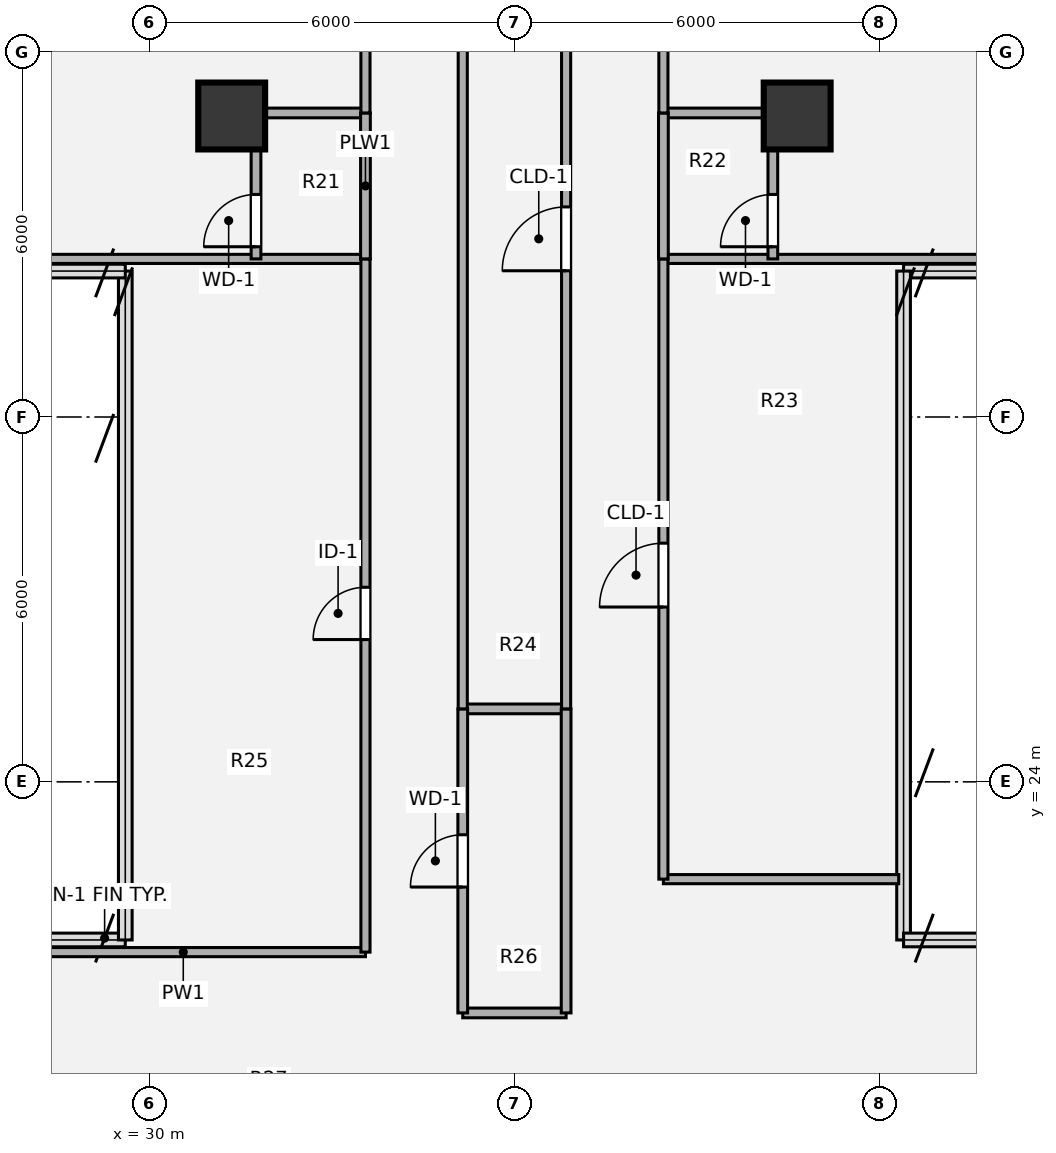
"""IFC4 building model, lengths in metres.
Left out: names, types, materials, properties, quantities, classifications, styles, units other than length and angle.
Written with IfcOpenShell. Run it as: python <this file> out.ifc"""

import sys

from ifc_helpers import new_model, si_unit, direction, frame, frame_2d, origin, origin_2d, place, context, subcontext, project, spatial, rectangle, hollow_circle, extrude, source, transform, mapped, element, fill, save


model = new_model("IFC4")
c1 = context("Model", 3, precision=1e-05, world=origin(), true_north=direction((0.0, 1.0)))
c2 = subcontext(c1, "Body", "Model", "MODEL_VIEW")
j1 = project(units=[si_unit("LENGTHUNIT", "METRE"), si_unit("PLANEANGLEUNIT", "RADIAN")], contexts=[c1])
p1 = place(None, origin())
s1 = spatial("IfcSite", under=j1, at=p1, CompositionType="ELEMENT")
p2 = place(p1, origin())
s2 = spatial("IfcBuilding", under=s1, at=p2, CompositionType="ELEMENT")
p3 = place(p2, frame((0.0, 0.0, 163.98)))
s3 = spatial("IfcBuildingStorey", under=s2, at=p3, CompositionType="ELEMENT", Elevation=163.98)
m1 = source(origin(), c2, "Body", "SweptSolid", [
    extrude(hollow_circle(Radius=0.55, WallThickness=0.04, at=origin_2d()), origin(), (0.0, 0.0, 1.0), 3.78),
])
for number, where, z_axis, x_axis in (
    (1, (31.35, 34.95, 0.0), (0.0, 0.0, 1.0), (1.0, 0.0, 0.0)),
    (2, (40.65, 34.95, 0.0), (0.0, 0.0, 1.0), (1.0, 0.0, 0.0)),
):
    element("IfcColumn", number, at=place(p3, frame(where, z_axis=z_axis, x_axis=x_axis)), inside=s3, PredefinedType="COLUMN", context=c2, shape_type="MappedRepresentation", body=[
        mapped(m1, transform((0.0, 0.0, 0.0), x_axis=(1.0, 0.0, 0.0), y_axis=(0.0, 1.0, 0.0), z_axis=(0.0, 0.0, 1.0), scale=1.0)),
    ])
p4 = place(p3, frame((35.15, 20.2, 0.0), z_axis=(0.0, 0.0, 1.0), x_axis=(1.0, 0.0, 0.0)))
e3 = element("IfcWall", 3, at=p4, inside=s3, PredefinedType="PLUMBINGWALL", context=c2, shape_type="SweptSolid", body=[
    extrude(rectangle(XDim=1.7, YDim=0.16, at=frame_2d((0.85, 0.0))), origin(), (0.0, 0.0, 1.0), 3.5),
])
p5 = place(p3, frame((27.558, 21.2, 0.0), z_axis=(0.0, 0.0, 1.0), x_axis=(1.0, 0.0, 0.0)))
e4 = element("IfcWall", 4, at=p5, inside=s3, PredefinedType="PARTITIONING", context=c2, shape_type="SweptSolid", body=[
    extrude(rectangle(XDim=5.992, YDim=0.15, at=frame_2d((2.996, 0.0))), origin(), (0.0, 0.0, 1.0), 3.5),
])
p6 = place(p3, frame((38.45, 22.4, 0.0), z_axis=(0.0, 0.0, 1.0), x_axis=(1.0, 0.0, 0.0)))
e5 = element("IfcWall", 5, at=p6, inside=s3, PredefinedType="PARTITIONING", context=c2, shape_type="SweptSolid", body=[
    extrude(rectangle(XDim=3.87, YDim=0.15, at=frame_2d((1.935, 0.0))), origin(), (0.0, 0.0, 1.0), 3.5),
])
p7 = place(p3, frame((35.15, 25.2, 0.0), z_axis=(0.0, 0.0, 1.0), x_axis=(1.0, 0.0, 0.0)))
e6 = element("IfcWall", 6, at=p7, inside=s3, PredefinedType="PLUMBINGWALL", context=c2, shape_type="SweptSolid", body=[
    extrude(rectangle(XDim=1.7, YDim=0.16, at=frame_2d((0.85, 0.0))), origin(), (0.0, 0.0, 1.0), 3.5),
])
p8 = place(p3, frame((27.557, 32.6, 0.0), z_axis=(0.0, 0.0, 1.0), x_axis=(1.0, 0.0, 0.0)))
e7 = element("IfcWall", 7, at=p8, inside=s3, PredefinedType="PARTITIONING", context=c2, shape_type="SweptSolid", body=[
    extrude(rectangle(XDim=5.993, YDim=0.15, at=frame_2d((2.997, 0.0))), origin(), (0.0, 0.0, 1.0), 3.5),
])
p9 = place(p3, frame((38.45, 32.6, 0.0), z_axis=(0.0, 0.0, 1.0), x_axis=(1.0, 0.0, 0.0)))
e8 = element("IfcWall", 8, at=p9, inside=s3, PredefinedType="PARTITIONING", context=c2, shape_type="SweptSolid", body=[
    extrude(rectangle(XDim=5.993, YDim=0.15, at=frame_2d((2.997, 0.0))), origin(), (0.0, 0.0, 1.0), 3.5),
])
for number, where, z_axis, x_axis in (
    (9, (31.75, 35.0, 0.0), (0.0, 0.0, 1.0), (1.0, 0.0, 0.0)),
    (10, (38.45, 35.0, 0.0), (0.0, 0.0, 1.0), (1.0, 0.0, 0.0)),
):
    element("IfcWall", number, at=place(p3, frame(where, z_axis=z_axis, x_axis=x_axis)), inside=s3, PredefinedType="PLUMBINGWALL", context=c2, shape_type="SweptSolid", body=[
        extrude(rectangle(XDim=1.8, YDim=0.16, at=frame_2d((0.9, 0.0))), origin(), (0.0, 0.0, 1.0), 2.903),
    ])
p10 = place(p3, frame((31.75, 32.6, 0.0), z_axis=(0.0, 0.0, 1.0), x_axis=(0.0, 1.0, 0.0)))
e11 = element("IfcWall", 11, at=p10, inside=s3, PredefinedType="PLUMBINGWALL", context=c2, shape_type="SweptSolid", body=[
    extrude(rectangle(XDim=2.4, YDim=0.16, at=frame_2d((1.2, 0.0))), origin(), (0.0, 0.0, 1.0), 3.5),
])
p11 = place(p10, frame((0.2, 0.0, 0.0)))
e12 = element("IfcOpeningElement", 12, at=p11, cuts=e11, PredefinedType="OPENING", context=c2, shape_type="SweptSolid", body=[
    extrude(rectangle(XDim=0.86, YDim=2.1, at=origin_2d()), frame((0.43, 0.09, 1.05), z_axis=(0.0, -1.0, 0.0), x_axis=(1.0, 0.0, 0.0)), (0.0, 0.0, 1.0), 0.18),
])
p12 = place(p3, frame((33.55, 21.2, 0.0), z_axis=(0.0, 0.0, 1.0), x_axis=(0.0, 1.0, 0.0)))
e13 = element("IfcWall", 13, at=p12, inside=s3, PredefinedType="PARTITIONING", context=c2, shape_type="SweptSolid", body=[
    extrude(rectangle(XDim=11.4, YDim=0.15, at=frame_2d((5.7, 0.0))), origin(), (0.0, 0.0, 1.0), 3.5),
])
p13 = place(p12, frame((5.14, 0.0, 0.0)))
e14 = element("IfcOpeningElement", 14, at=p13, cuts=e13, PredefinedType="OPENING", context=c2, shape_type="SweptSolid", body=[
    extrude(rectangle(XDim=0.86, YDim=2.1, at=origin_2d()), frame((0.43, 0.085, 1.05), z_axis=(0.0, -1.0, 0.0), x_axis=(1.0, 0.0, 0.0)), (0.0, 0.0, 1.0), 0.17),
])
p14 = place(p3, frame((33.55, 32.6, 0.0), z_axis=(0.0, 0.0, 1.0), x_axis=(0.0, 1.0, 0.0)))
e15 = element("IfcWall", 15, at=p14, inside=s3, PredefinedType="PLUMBINGWALL", context=c2, shape_type="SweptSolid", body=[
    extrude(rectangle(XDim=2.4, YDim=0.16, at=frame_2d((1.2, 0.0))), origin(), (0.0, 0.0, 1.0), 3.5),
])
p15 = place(p3, frame((33.55, 35.0, 0.0), z_axis=(0.0, 0.0, 1.0), x_axis=(0.0, 1.0, 0.0)))
e16 = element("IfcWall", 16, at=p15, inside=s3, PredefinedType="PARTITIONING", context=c2, shape_type="SweptSolid", body=[
    extrude(rectangle(XDim=3.888, YDim=0.15, at=frame_2d((1.944, 0.0))), origin(), (0.0, 0.0, 1.0), 3.5),
])
p16 = place(p15, frame((1.484, 0.0, 0.0)))
e17 = element("IfcOpeningElement", 17, at=p16, cuts=e16, PredefinedType="OPENING", context=c2, shape_type="SweptSolid", body=[
    extrude(rectangle(XDim=0.92, YDim=2.1, at=origin_2d()), frame((0.46, 0.085, 1.05), z_axis=(0.0, -1.0, 0.0), x_axis=(1.0, 0.0, 0.0)), (0.0, 0.0, 1.0), 0.17),
])
p17 = place(p3, frame((35.15, 20.2, 0.0), z_axis=(0.0, 0.0, 1.0), x_axis=(0.0, 1.0, 0.0)))
e18 = element("IfcWall", 18, at=p17, inside=s3, PredefinedType="PLUMBINGWALL", context=c2, shape_type="SweptSolid", body=[
    extrude(rectangle(XDim=5.0, YDim=0.16, at=frame_2d((2.5, 0.0))), origin(), (0.0, 0.0, 1.0), 3.5),
])
p18 = place(p17, frame((2.07, 0.0, 0.0)))
e19 = element("IfcOpeningElement", 19, at=p18, cuts=e18, PredefinedType="OPENING", context=c2, shape_type="SweptSolid", body=[
    extrude(rectangle(XDim=0.86, YDim=2.1, at=origin_2d()), frame((0.43, 0.09, 1.05), z_axis=(0.0, -1.0, 0.0), x_axis=(1.0, 0.0, 0.0)), (0.0, 0.0, 1.0), 0.18),
])
p19 = place(p3, frame((35.15, 25.2, 0.0), z_axis=(0.0, 0.0, 1.0), x_axis=(0.0, 1.0, 0.0)))
e20 = element("IfcWall", 20, at=p19, inside=s3, PredefinedType="PARTITIONING", context=c2, shape_type="SweptSolid", body=[
    extrude(rectangle(XDim=15.46, YDim=0.15, at=frame_2d((7.73, 0.0))), origin(), (0.0, 0.0, 1.0), 3.5),
])
p20 = place(p3, frame((36.85, 20.2, 0.0), z_axis=(0.0, 0.0, 1.0), x_axis=(0.0, 1.0, 0.0)))
e21 = element("IfcWall", 21, at=p20, inside=s3, PredefinedType="PLUMBINGWALL", context=c2, shape_type="SweptSolid", body=[
    extrude(rectangle(XDim=5.0, YDim=0.16, at=frame_2d((2.5, 0.0))), origin(), (0.0, 0.0, 1.0), 3.5),
])
p21 = place(p3, frame((36.85, 25.2, 0.0), z_axis=(0.0, 0.0, 1.0), x_axis=(0.0, 1.0, 0.0)))
e22 = element("IfcWall", 22, at=p21, inside=s3, PredefinedType="PARTITIONING", context=c2, shape_type="SweptSolid", body=[
    extrude(rectangle(XDim=15.46, YDim=0.15, at=frame_2d((7.73, 0.0))), origin(), (0.0, 0.0, 1.0), 3.5),
])
p22 = place(p21, frame((7.205, 0.0, 0.0)))
e23 = element("IfcOpeningElement", 23, at=p22, cuts=e22, PredefinedType="OPENING", context=c2, shape_type="SweptSolid", body=[
    extrude(rectangle(XDim=1.05, YDim=2.1, at=origin_2d()), frame((0.525, 0.085, 1.05), z_axis=(0.0, -1.0, 0.0), x_axis=(1.0, 0.0, 0.0)), (0.0, 0.0, 1.0), 0.17),
])
p23 = place(p3, frame((38.45, 22.4, 0.0), z_axis=(0.0, 0.0, 1.0), x_axis=(0.0, 1.0, 0.0)))
e24 = element("IfcWall", 24, at=p23, inside=s3, PredefinedType="PARTITIONING", context=c2, shape_type="SweptSolid", body=[
    extrude(rectangle(XDim=10.2, YDim=0.15, at=frame_2d((5.1, 0.0))), origin(), (0.0, 0.0, 1.0), 3.5),
])
p24 = place(p23, frame((4.475, 0.0, 0.0)))
e25 = element("IfcOpeningElement", 25, at=p24, cuts=e24, PredefinedType="OPENING", context=c2, shape_type="SweptSolid", body=[
    extrude(rectangle(XDim=1.05, YDim=2.1, at=origin_2d()), frame((0.525, 0.085, 1.05), z_axis=(0.0, -1.0, 0.0), x_axis=(1.0, 0.0, 0.0)), (0.0, 0.0, 1.0), 0.17),
])
p25 = place(p3, frame((38.45, 32.6, 0.0), z_axis=(0.0, 0.0, 1.0), x_axis=(0.0, 1.0, 0.0)))
e26 = element("IfcWall", 26, at=p25, inside=s3, PredefinedType="PLUMBINGWALL", context=c2, shape_type="SweptSolid", body=[
    extrude(rectangle(XDim=2.4, YDim=0.16, at=frame_2d((1.2, 0.0))), origin(), (0.0, 0.0, 1.0), 3.5),
])
p26 = place(p3, frame((38.45, 35.0, 0.0), z_axis=(0.0, 0.0, 1.0), x_axis=(0.0, 1.0, 0.0)))
e27 = element("IfcWall", 27, at=p26, inside=s3, PredefinedType="PARTITIONING", context=c2, shape_type="SweptSolid", body=[
    extrude(rectangle(XDim=3.888, YDim=0.15, at=frame_2d((1.944, 0.0))), origin(), (0.0, 0.0, 1.0), 3.5),
])
p27 = place(p26, frame((1.484, 0.0, 0.0)))
e28 = element("IfcOpeningElement", 28, at=p27, cuts=e27, PredefinedType="OPENING", context=c2, shape_type="SweptSolid", body=[
    extrude(rectangle(XDim=0.92, YDim=2.1, at=origin_2d()), frame((0.46, 0.085, 1.05), z_axis=(0.0, -1.0, 0.0), x_axis=(1.0, 0.0, 0.0)), (0.0, 0.0, 1.0), 0.17),
])
p28 = place(p3, frame((40.25, 32.6, 0.0), z_axis=(0.0, 0.0, 1.0), x_axis=(0.0, 1.0, 0.0)))
e29 = element("IfcWall", 29, at=p28, inside=s3, PredefinedType="PLUMBINGWALL", context=c2, shape_type="SweptSolid", body=[
    extrude(rectangle(XDim=2.4, YDim=0.16, at=frame_2d((1.2, 0.0))), origin(), (0.0, 0.0, 1.0), 3.5),
])
p29 = place(p28, frame((0.2, 0.0, 0.0)))
e30 = element("IfcOpeningElement", 30, at=p29, cuts=e29, PredefinedType="OPENING", context=c2, shape_type="SweptSolid", body=[
    extrude(rectangle(XDim=0.86, YDim=2.1, at=origin_2d()), frame((0.43, 0.09, 1.05), z_axis=(0.0, -1.0, 0.0), x_axis=(1.0, 0.0, 0.0)), (0.0, 0.0, 1.0), 0.18),
])
m2 = source(origin(), c2, "Body", "SweptSolid", [
    extrude(rectangle(XDim=0.86, YDim=2.1, at=origin_2d()), frame((0.43, 0.025, 1.05), z_axis=(0.0, -1.0, 0.0), x_axis=(1.0, 0.0, 0.0)), (0.0, 0.0, 1.0), 0.05),
])
p30 = place(p11, origin())
e31 = element("IfcDoor", 31, at=p30, inside=s3, OperationType="SINGLE_SWING_LEFT", PredefinedType="DOOR", context=c2, shape_type="MappedRepresentation", body=[
    mapped(m2, transform((0.0, 0.0, 0.0), x_axis=(1.0, 0.0, 0.0), y_axis=(0.0, 1.0, 0.0), z_axis=(0.0, 0.0, 1.0), scale=1.0)),
])
fill(e12, e31)
m3 = source(origin(), c2, "Body", "SweptSolid", [
    extrude(rectangle(XDim=0.86, YDim=2.1, at=origin_2d()), frame((0.43, 0.025, 1.05), z_axis=(0.0, -1.0, 0.0), x_axis=(1.0, 0.0, 0.0)), (0.0, 0.0, 1.0), 0.05),
])
p31 = place(p13, origin())
e32 = element("IfcDoor", 32, at=p31, inside=s3, OperationType="SINGLE_SWING_LEFT", PredefinedType="DOOR", context=c2, shape_type="MappedRepresentation", body=[
    mapped(m3, transform((0.0, 0.0, 0.0), x_axis=(1.0, 0.0, 0.0), y_axis=(0.0, 1.0, 0.0), z_axis=(0.0, 0.0, 1.0), scale=1.0)),
])
fill(e14, e32)
p32 = place(p18, origin())
e33 = element("IfcDoor", 33, at=p32, inside=s3, OperationType="SINGLE_SWING_LEFT", PredefinedType="DOOR", context=c2, shape_type="MappedRepresentation", body=[
    mapped(m2, transform((0.0, 0.0, 0.0), x_axis=(1.0, 0.0, 0.0), y_axis=(0.0, 1.0, 0.0), z_axis=(0.0, 0.0, 1.0), scale=1.0)),
])
fill(e19, e33)
m4 = source(origin(), c2, "Body", "SweptSolid", [
    extrude(rectangle(XDim=1.05, YDim=2.1, at=origin_2d()), frame((0.525, 0.025, 1.05), z_axis=(0.0, -1.0, 0.0), x_axis=(1.0, 0.0, 0.0)), (0.0, 0.0, 1.0), 0.05),
])
p33 = place(p22, origin())
e34 = element("IfcDoor", 34, at=p33, inside=s3, OperationType="SINGLE_SWING_LEFT", PredefinedType="DOOR", context=c2, shape_type="MappedRepresentation", body=[
    mapped(m4, transform((0.0, 0.0, 0.0), x_axis=(1.0, 0.0, 0.0), y_axis=(0.0, 1.0, 0.0), z_axis=(0.0, 0.0, 1.0), scale=1.0)),
])
fill(e23, e34)
p34 = place(p24, origin())
e35 = element("IfcDoor", 35, at=p34, inside=s3, OperationType="SINGLE_SWING_LEFT", PredefinedType="DOOR", context=c2, shape_type="MappedRepresentation", body=[
    mapped(m4, transform((0.0, 0.0, 0.0), x_axis=(1.0, 0.0, 0.0), y_axis=(0.0, 1.0, 0.0), z_axis=(0.0, 0.0, 1.0), scale=1.0)),
])
fill(e25, e35)
p35 = place(p29, origin())
e36 = element("IfcDoor", 36, at=p35, inside=s3, OperationType="SINGLE_SWING_LEFT", PredefinedType="DOOR", context=c2, shape_type="MappedRepresentation", body=[
    mapped(m2, transform((0.0, 0.0, 0.0), x_axis=(1.0, 0.0, 0.0), y_axis=(0.0, 1.0, 0.0), z_axis=(0.0, 0.0, 1.0), scale=1.0)),
])
fill(e30, e36)
save(model, sys.argv[1])
